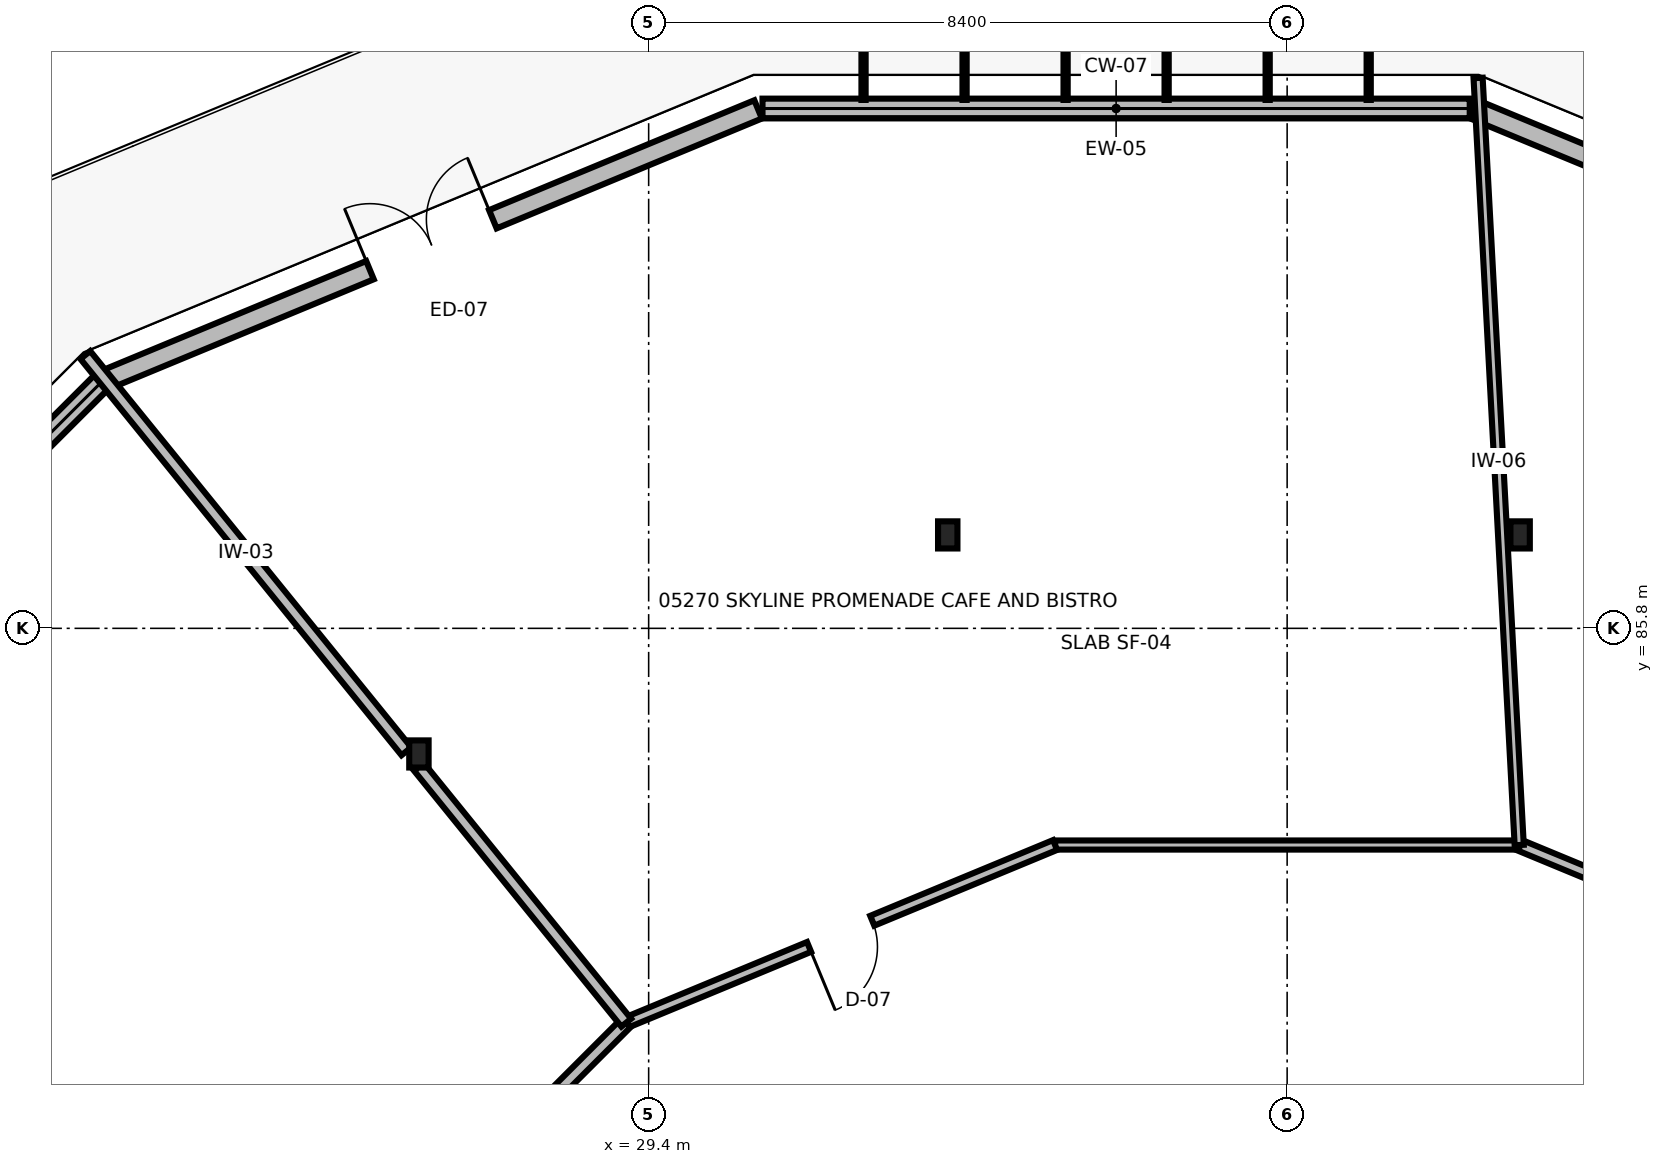
"""IFC4 building model, lengths in metres.
Left out: names, types, materials, properties, quantities, classifications, styles, units other than length and angle.
Written with IfcOpenShell. Run it as: python <this file> out.ifc"""

import sys

from ifc_helpers import new_model, si_unit, direction, frame, frame_2d, origin, origin_2d, place, context, subcontext, project, spatial, rectangle, i_section, extrude, element, fill, save


model = new_model("IFC4")
c1 = context("Model", 3, precision=1e-05, world=origin(), true_north=direction((0.0, 1.0)))
c2 = subcontext(c1, "Body", "Model", "MODEL_VIEW")
j1 = project(units=[si_unit("LENGTHUNIT", "METRE"), si_unit("PLANEANGLEUNIT", "RADIAN")], contexts=[c1])
p1 = place(None, origin())
s1 = spatial("IfcSite", under=j1, at=p1, CompositionType="ELEMENT")
p2 = place(p1, origin())
s2 = spatial("IfcBuilding", under=s1, at=p2, CompositionType="ELEMENT")
p3 = place(p2, frame((0.0, 0.0, 21.6)))
s3 = spatial("IfcBuildingStorey", under=s2, at=p3, CompositionType="ELEMENT", Elevation=21.6)
for number, where, z_axis, x_axis in (
    (1, (40.865, 87.029, 0.0), (0.0, 0.0, 1.0), (1.0, 0.0, 0.0)),
    (2, (33.335, 87.029, 0.0), (0.0, 0.0, 1.0), (1.0, 0.0, 0.0)),
    (3, (26.377, 84.147, 0.0), (0.0, 0.0, 1.0), (1.0, 0.0, 0.0)),
):
    element("IfcColumn", number, at=place(p3, frame(where, z_axis=z_axis, x_axis=x_axis)), inside=s3, PredefinedType="COLUMN", context=c2, shape_type="SweptSolid", body=[
        extrude(i_section(OverallWidth=0.255, OverallDepth=0.357, WebThickness=0.01, FlangeThickness=0.018, at=origin_2d()), origin(), (0.0, 0.0, 1.0), 3.9),
    ])
p4 = place(p3, frame((48.856, 89.067, 0.0), z_axis=(0.0, 0.0, 1.0), x_axis=(-0.923889229931, 0.382660019884, 0.0)))
e4 = element("IfcWall", 4, at=p4, inside=s3, PredefinedType="SOLIDWALL", context=c2, shape_type="SweptSolid", body=[
    extrude(rectangle(XDim=9.304, YDim=0.26, at=frame_2d((4.652, 0.0))), origin(), (0.0, 0.0, 1.0), 2.979),
])
p5 = place(p4, frame((3.702, 0.0, 0.0)))
e5 = element("IfcOpeningElement", 5, at=p5, cuts=e4, PredefinedType="OPENING", context=c2, shape_type="SweptSolid", body=[
    extrude(rectangle(XDim=1.9, YDim=2.3, at=frame_2d((0.95, 1.15))), frame((0.0, 0.14, 0.0), z_axis=(0.0, -1.0, 0.0), x_axis=(1.0, 0.0, 0.0)), (0.0, 0.0, 1.0), 0.28),
])
p6 = place(p3, frame((40.202, 92.639, 0.0), z_axis=(0.0, 0.0, 1.0), x_axis=(-1.0, 0.0, 0.0)))
e6 = element("IfcWall", 6, at=p6, inside=s3, PredefinedType="SOLIDWALL", context=c2, shape_type="SweptSolid", body=[
    extrude(rectangle(XDim=9.304, YDim=0.26, at=frame_2d((4.652, 0.0))), origin(), (0.0, 0.0, 1.0), 1.48),
])
p7 = place(p3, frame((30.84, 92.627, 0.0), z_axis=(0.0, 0.0, 1.0), x_axis=(-0.923893072101, -0.382650743268, 0.0)))
e7 = element("IfcWall", 7, at=p7, inside=s3, PredefinedType="SOLIDWALL", context=c2, shape_type="SweptSolid", body=[
    extrude(rectangle(XDim=9.304, YDim=0.26, at=frame_2d((4.652, 0.0))), origin(), (0.0, 0.0, 1.0), 2.505),
])
p8 = place(p7, frame((3.777, 0.0, 0.0)))
e8 = element("IfcOpeningElement", 8, at=p8, cuts=e7, PredefinedType="OPENING", context=c2, shape_type="SweptSolid", body=[
    extrude(rectangle(XDim=1.75, YDim=2.25, at=frame_2d((0.875, 1.125))), frame((0.0, 0.14, 0.0), z_axis=(0.0, -1.0, 0.0), x_axis=(1.0, 0.0, 0.0)), (0.0, 0.0, 1.0), 0.28),
])
p9 = place(p3, frame((22.195, 89.034, 0.0), z_axis=(0.0, 0.0, 1.0), x_axis=(-0.70709366147, -0.707119900659, 0.0)))
e9 = element("IfcWall", 9, at=p9, inside=s3, PredefinedType="SOLIDWALL", context=c2, shape_type="SweptSolid", body=[
    extrude(rectangle(XDim=9.304, YDim=0.26, at=frame_2d((4.652, 0.0))), origin(), (0.0, 0.0, 1.0), 1.48),
])
p10 = place(p3, frame((46.495, 80.613, 0.0), z_axis=(0.0, 0.0, 1.0), x_axis=(-0.92388282315, 0.382675487963, 0.0)))
e10 = element("IfcWall", 10, at=p10, inside=s3, PredefinedType="PARTITIONING", context=c2, shape_type="SweptSolid", body=[
    extrude(rectangle(XDim=6.106, YDim=0.15, at=frame_2d((3.053, 0.0))), origin(), (0.0, 0.0, 1.0), 2.839),
])
p11 = place(p10, frame((2.278, 0.0, 0.0)))
e11 = element("IfcOpeningElement", 11, at=p11, cuts=e10, PredefinedType="OPENING", context=c2, shape_type="SweptSolid", body=[
    extrude(rectangle(XDim=1.55, YDim=2.3, at=frame_2d((0.775, 1.15))), frame((0.0, 0.085, 0.0), z_axis=(0.0, -1.0, 0.0), x_axis=(1.0, 0.0, 0.0)), (0.0, 0.0, 1.0), 0.17),
])
p12 = place(p3, frame((40.853, 82.949, 0.0), z_axis=(0.0, 0.0, 1.0), x_axis=(-1.0, 0.0, 0.0)))
e12 = element("IfcWall", 12, at=p12, inside=s3, PredefinedType="PARTITIONING", context=c2, shape_type="SweptSolid", body=[
    extrude(rectangle(XDim=6.106, YDim=0.12, at=frame_2d((3.053, 0.0))), origin(), (0.0, 0.0, 1.0), 2.839),
])
p13 = place(p3, frame((34.747, 82.949, 0.0), z_axis=(0.0, 0.0, 1.0), x_axis=(-0.92388867793, -0.382661352625, 0.0)))
e13 = element("IfcWall", 13, at=p13, inside=s3, PredefinedType="PARTITIONING", context=c2, shape_type="SweptSolid", body=[
    extrude(rectangle(XDim=6.106, YDim=0.14, at=frame_2d((3.053, 0.0))), origin(), (0.0, 0.0, 1.0), 2.839),
])
p14 = place(p13, frame((2.603, 0.0, 0.0)))
e14 = element("IfcOpeningElement", 14, at=p14, cuts=e13, PredefinedType="OPENING", context=c2, shape_type="SweptSolid", body=[
    extrude(rectangle(XDim=0.9, YDim=2.1, at=frame_2d((0.45, 1.05))), frame((0.0, 0.08, 0.0), z_axis=(0.0, -1.0, 0.0), x_axis=(1.0, 0.0, 0.0)), (0.0, 0.0, 1.0), 0.16),
])
p15 = place(p3, frame((29.105, 80.613, 0.0), z_axis=(0.0, 0.0, 1.0), x_axis=(-0.707086789759, -0.707126772049, 0.0)))
e15 = element("IfcWall", 15, at=p15, inside=s3, PredefinedType="PARTITIONING", context=c2, shape_type="SweptSolid", body=[
    extrude(rectangle(XDim=6.106, YDim=0.165, at=frame_2d((3.053, 0.0))), origin(), (0.0, 0.0, 1.0), 2.839),
])
p16 = place(p3, frame((40.853, 82.949, 0.0), z_axis=(0.0, 0.0, 1.0), x_axis=(-0.053532574169, 0.998566103722, 0.0)))
e16 = element("IfcWall", 16, at=p16, inside=s3, PredefinedType="PARTITIONING", context=c2, shape_type="SweptSolid", body=[
    extrude(rectangle(XDim=10.106, YDim=0.12, at=frame_2d((5.053, 0.0))), origin(), (0.0, 0.0, 1.0), 2.505),
])
p17 = place(p3, frame((29.105, 80.613, 0.0), z_axis=(0.0, 0.0, 1.0), x_axis=(-0.62952074794, 0.776983672874, 0.0)))
e17 = element("IfcWall", 17, at=p17, inside=s3, PredefinedType="PARTITIONING", context=c2, shape_type="SweptSolid", body=[
    extrude(rectangle(XDim=4.333, YDim=0.165, at=frame_2d((2.167, 0.0))), origin(), (0.0, 0.0, 1.0), 2.839),
])
p18 = place(p3, frame((26.213, 84.183, 0.0), z_axis=(0.0, 0.0, 1.0), x_axis=(-0.629541466826, 0.776966885746, 0.0)))
e18 = element("IfcWall", 18, at=p18, inside=s3, PredefinedType="PARTITIONING", context=c2, shape_type="SweptSolid", body=[
    extrude(rectangle(XDim=6.71, YDim=0.165, at=frame_2d((3.355, 0.0))), origin(), (0.0, 0.0, 1.0), 2.505),
])
p19 = place(p8, frame((1.75, 0.0, 0.0), z_axis=(0.0, 0.0, 1.0), x_axis=(-1.0, 0.0, 0.0)))
e19 = element("IfcDoor", 19, at=p19, inside=s3, OperationType="DOUBLE_DOOR_SINGLE_SWING", PredefinedType="DOOR", context=c2, shape_type="SweptSolid", body=[
    extrude(rectangle(XDim=1.75, YDim=2.25, at=frame_2d((0.875, 1.125))), frame((0.0, 0.025, 0.0), z_axis=(0.0, -1.0, 0.0), x_axis=(1.0, 0.0, 0.0)), (0.0, 0.0, 1.0), 0.05),
])
fill(e8, e19)
p20 = place(p14, frame((0.9, 0.0, 0.0), z_axis=(0.0, 0.0, 1.0), x_axis=(-1.0, 0.0, 0.0)))
e20 = element("IfcDoor", 20, at=p20, inside=s3, OperationType="SINGLE_SWING_LEFT", PredefinedType="DOOR", context=c2, shape_type="SweptSolid", body=[
    extrude(rectangle(XDim=0.9, YDim=2.1, at=frame_2d((0.45, 1.05))), frame((0.0, 0.025, 0.0), z_axis=(0.0, -1.0, 0.0), x_axis=(1.0, 0.0, 0.0)), (0.0, 0.0, 1.0), 0.05),
])
fill(e14, e20)
save(model, sys.argv[1])
